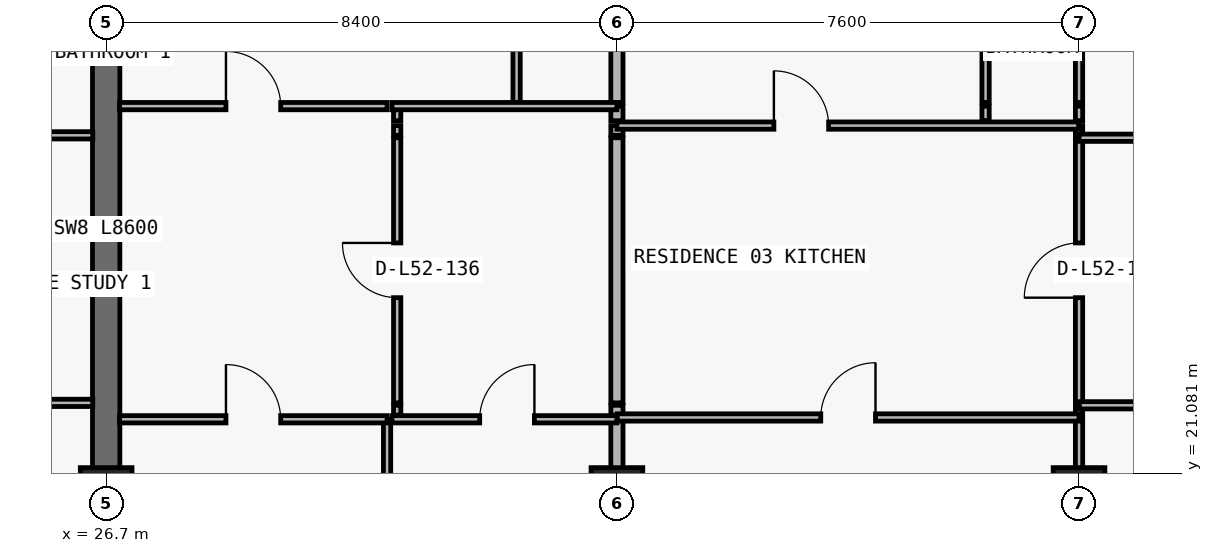
"""IFC4 building model, lengths in metres.
Left out: names, types, materials, properties, quantities, classifications, styles, units other than length and angle.
Written with IfcOpenShell. Run it as: python <this file> out.ifc"""

import sys

from ifc_helpers import new_model, si_unit, direction, frame, frame_2d, origin, origin_2d, place, context, subcontext, project, spatial, rectangle, extrude, element, fill, save


model = new_model("IFC4")
c1 = context("Model", 3, precision=1e-05, world=origin(), true_north=direction((0.0, 1.0)))
c2 = subcontext(c1, "Body", "Model", "MODEL_VIEW")
j1 = project(units=[si_unit("LENGTHUNIT", "METRE"), si_unit("PLANEANGLEUNIT", "RADIAN")], contexts=[c1])
p1 = place(None, origin())
s1 = spatial("IfcSite", under=j1, at=p1, CompositionType="ELEMENT")
p2 = place(p1, origin())
s2 = spatial("IfcBuilding", under=s1, at=p2, CompositionType="ELEMENT")
p3 = place(p2, frame((0.0, 0.0, 188.4)))
s3 = spatial("IfcBuildingStorey", under=s2, at=p3, CompositionType="ELEMENT", Elevation=188.4)
for number, where, z_axis, x_axis in (
    (1, (26.7, 20.8, 0.0), (0.0, 0.0, 1.0), (1.0, 0.0, 0.0)),
    (2, (35.1, 20.8, 0.0), (0.0, 0.0, 1.0), (1.0, 0.0, 0.0)),
    (3, (42.7, 20.8, 0.0), (0.0, 0.0, 1.0), (1.0, 0.0, 0.0)),
):
    element("IfcColumn", number, at=place(p3, frame(where, z_axis=z_axis, x_axis=x_axis)), inside=s3, PredefinedType="COLUMN", context=c2, shape_type="SweptSolid", body=[
        extrude(rectangle(XDim=0.85, YDim=0.75, at=origin_2d()), origin(), (0.0, 0.0, 1.0), 3.05),
    ])
p4 = place(p3, frame((26.7, 20.8, 0.0), z_axis=(0.0, 0.0, 1.0), x_axis=(0.0, 1.0, 0.0)))
e4 = element("IfcWall", 4, at=p4, inside=s3, PredefinedType="SHEAR", context=c2, shape_type="SweptSolid", body=[
    extrude(rectangle(XDim=8.6, YDim=0.45, at=frame_2d((4.3, 0.0))), origin(), (0.0, 0.0, 1.0), 3.05),
])
p5 = place(p3, frame((31.32, 11.24, 0.0), z_axis=(0.0, 0.0, 1.0), x_axis=(0.0, 1.0, 0.0)))
e5 = element("IfcWall", 5, at=p5, inside=s3, PredefinedType="PARTITIONING", context=c2, shape_type="SweptSolid", body=[
    extrude(rectangle(XDim=10.73, YDim=0.12, at=frame_2d((5.365, 0.0))), origin(), (0.0, 0.0, 1.0), 3.05),
])
p6 = place(p3, frame((31.486, 22.04, 0.0), z_axis=(0.0, 0.0, 1.0), x_axis=(0.0, 1.0, 0.0)))
e6 = element("IfcWall", 6, at=p6, inside=s3, PredefinedType="PARTITIONING", context=c2, shape_type="SweptSolid", body=[
    extrude(rectangle(XDim=0.16, YDim=0.12, at=frame_2d((0.08, 0.0))), origin(), (0.0, 0.0, 1.0), 3.05),
])
p7 = place(p3, frame((31.486, 22.24, 0.0), z_axis=(0.0, 0.0, 1.0), x_axis=(0.0, 1.0, 0.0)))
e7 = element("IfcWall", 7, at=p7, inside=s3, PredefinedType="PARTITIONING", context=c2, shape_type="SweptSolid", body=[
    extrude(rectangle(XDim=4.36, YDim=0.12, at=frame_2d((2.18, 0.0))), origin(), (0.0, 0.0, 1.0), 3.05),
])
p8 = place(p7, frame((1.73, 0.0, 0.0)))
e8 = element("IfcOpeningElement", 8, at=p8, cuts=e7, PredefinedType="OPENING", context=c2, shape_type="SweptSolid", body=[
    extrude(rectangle(XDim=0.9, YDim=2.15, at=frame_2d((0.45, 1.075))), frame((0.0, 0.07, 0.0), z_axis=(0.0, -1.0, 0.0), x_axis=(1.0, 0.0, 0.0)), (0.0, 0.0, 1.0), 0.14),
])
p9 = place(p3, frame((31.486, 26.64, 0.0), z_axis=(0.0, 0.0, 1.0), x_axis=(0.0, 1.0, 0.0)))
e9 = element("IfcWall", 9, at=p9, inside=s3, PredefinedType="PARTITIONING", context=c2, shape_type="SweptSolid", body=[
    extrude(rectangle(XDim=0.16, YDim=0.12, at=frame_2d((0.08, 0.0))), origin(), (0.0, 0.0, 1.0), 3.05),
])
p10 = place(p3, frame((31.486, 26.88, 0.0), z_axis=(0.0, 0.0, 1.0), x_axis=(0.0, 1.0, 0.0)))
e10 = element("IfcWall", 10, at=p10, inside=s3, PredefinedType="PARTITIONING", context=c2, shape_type="SweptSolid", body=[
    extrude(rectangle(XDim=0.24, YDim=0.12, at=frame_2d((0.12, 0.0))), origin(), (0.0, 0.0, 1.0), 3.05),
])
p11 = place(p3, frame((33.45, 27.18, 0.0), z_axis=(0.0, 0.0, 1.0), x_axis=(0.0, 1.0, 0.0)))
e11 = element("IfcWall", 11, at=p11, inside=s3, PredefinedType="PARTITIONING", context=c2, shape_type="SweptSolid", body=[
    extrude(rectangle(XDim=6.32, YDim=0.12, at=frame_2d((3.16, 0.0))), origin(), (0.0, 0.0, 1.0), 3.05),
])
p12 = place(p11, frame((3.035, 0.0, 0.0)))
e12 = element("IfcOpeningElement", 12, at=p12, cuts=e11, PredefinedType="OPENING", context=c2, shape_type="SweptSolid", body=[
    extrude(rectangle(XDim=0.85, YDim=2.1, at=frame_2d((0.425, 1.05))), frame((0.0, 0.07, 0.0), z_axis=(0.0, -1.0, 0.0), x_axis=(1.0, 0.0, 0.0)), (0.0, 0.0, 1.0), 0.14),
])
p13 = place(p3, frame((35.1, 11.24, 0.0), z_axis=(0.0, 0.0, 1.0), x_axis=(0.0, 1.0, 0.0)))
e13 = element("IfcWall", 13, at=p13, inside=s3, PredefinedType="PARTITIONING", context=c2, shape_type="SweptSolid", body=[
    extrude(rectangle(XDim=10.73, YDim=0.2, at=frame_2d((5.365, 0.0))), origin(), (0.0, 0.0, 1.0), 2.263),
])
p14 = place(p3, frame((35.1, 22.04, 0.0), z_axis=(0.0, 0.0, 1.0), x_axis=(0.0, 1.0, 0.0)))
e14 = element("IfcWall", 14, at=p14, inside=s3, PredefinedType="PARTITIONING", context=c2, shape_type="SweptSolid", body=[
    extrude(rectangle(XDim=0.16, YDim=0.2, at=frame_2d((0.08, 0.0))), origin(), (0.0, 0.0, 1.0), 2.263),
])
p15 = place(p3, frame((35.1, 22.24, 0.0), z_axis=(0.0, 0.0, 1.0), x_axis=(0.0, 1.0, 0.0)))
e15 = element("IfcWall", 15, at=p15, inside=s3, PredefinedType="PARTITIONING", context=c2, shape_type="SweptSolid", body=[
    extrude(rectangle(XDim=4.36, YDim=0.2, at=frame_2d((2.18, 0.0))), origin(), (0.0, 0.0, 1.0), 2.263),
])
p16 = place(p3, frame((35.1, 26.64, 0.0), z_axis=(0.0, 0.0, 1.0), x_axis=(0.0, 1.0, 0.0)))
e16 = element("IfcWall", 16, at=p16, inside=s3, PredefinedType="PARTITIONING", context=c2, shape_type="SweptSolid", body=[
    extrude(rectangle(XDim=0.16, YDim=0.2, at=frame_2d((0.08, 0.0))), origin(), (0.0, 0.0, 1.0), 2.263),
])
p17 = place(p3, frame((35.1, 26.88, 0.0), z_axis=(0.0, 0.0, 1.0), x_axis=(0.0, 1.0, 0.0)))
e17 = element("IfcWall", 17, at=p17, inside=s3, PredefinedType="PARTITIONING", context=c2, shape_type="SweptSolid", body=[
    extrude(rectangle(XDim=0.24, YDim=0.2, at=frame_2d((0.12, 0.0))), origin(), (0.0, 0.0, 1.0), 2.263),
])
p18 = place(p3, frame((35.1, 27.18, 0.0), z_axis=(0.0, 0.0, 1.0), x_axis=(0.0, 1.0, 0.0)))
e18 = element("IfcWall", 18, at=p18, inside=s3, PredefinedType="PARTITIONING", context=c2, shape_type="SweptSolid", body=[
    extrude(rectangle(XDim=6.32, YDim=0.2, at=frame_2d((3.16, 0.0))), origin(), (0.0, 0.0, 1.0), 2.263),
])
p19 = place(p3, frame((41.163, 26.88, 0.0), z_axis=(0.0, 0.0, 1.0), x_axis=(0.0, 1.0, 0.0)))
e19 = element("IfcWall", 19, at=p19, inside=s3, PredefinedType="PARTITIONING", context=c2, shape_type="SweptSolid", body=[
    extrude(rectangle(XDim=0.24, YDim=0.12, at=frame_2d((0.12, 0.0))), origin(), (0.0, 0.0, 1.0), 3.05),
])
p20 = place(p3, frame((41.163, 27.18, 0.0), z_axis=(0.0, 0.0, 1.0), x_axis=(0.0, 1.0, 0.0)))
e20 = element("IfcWall", 20, at=p20, inside=s3, PredefinedType="PARTITIONING", context=c2, shape_type="SweptSolid", body=[
    extrude(rectangle(XDim=6.32, YDim=0.12, at=frame_2d((3.16, 0.0))), origin(), (0.0, 0.0, 1.0), 3.05),
])
p21 = place(p20, frame((3.035, 0.0, 0.0)))
e21 = element("IfcOpeningElement", 21, at=p21, cuts=e20, PredefinedType="OPENING", context=c2, shape_type="SweptSolid", body=[
    extrude(rectangle(XDim=0.85, YDim=2.1, at=frame_2d((0.425, 1.05))), frame((0.0, 0.07, 0.0), z_axis=(0.0, -1.0, 0.0), x_axis=(1.0, 0.0, 0.0)), (0.0, 0.0, 1.0), 0.14),
])
p22 = place(p3, frame((42.7, 11.24, 0.0), z_axis=(0.0, 0.0, 1.0), x_axis=(0.0, 1.0, 0.0)))
e22 = element("IfcWall", 22, at=p22, inside=s3, PredefinedType="PARTITIONING", context=c2, shape_type="SweptSolid", body=[
    extrude(rectangle(XDim=10.73, YDim=0.12, at=frame_2d((5.365, 0.0))), origin(), (0.0, 0.0, 1.0), 2.263),
])
p23 = place(p3, frame((42.7, 22.04, 0.0), z_axis=(0.0, 0.0, 1.0), x_axis=(0.0, 1.0, 0.0)))
e23 = element("IfcWall", 23, at=p23, inside=s3, PredefinedType="PARTITIONING", context=c2, shape_type="SweptSolid", body=[
    extrude(rectangle(XDim=0.16, YDim=0.12, at=frame_2d((0.08, 0.0))), origin(), (0.0, 0.0, 1.0), 2.263),
])
p24 = place(p3, frame((42.7, 22.24, 0.0), z_axis=(0.0, 0.0, 1.0), x_axis=(0.0, 1.0, 0.0)))
e24 = element("IfcWall", 24, at=p24, inside=s3, PredefinedType="PARTITIONING", context=c2, shape_type="SweptSolid", body=[
    extrude(rectangle(XDim=4.36, YDim=0.12, at=frame_2d((2.18, 0.0))), origin(), (0.0, 0.0, 1.0), 2.263),
])
p25 = place(p24, frame((1.73, 0.0, 0.0)))
e25 = element("IfcOpeningElement", 25, at=p25, cuts=e24, PredefinedType="OPENING", context=c2, shape_type="SweptSolid", body=[
    extrude(rectangle(XDim=0.9, YDim=2.15, at=frame_2d((0.45, 1.075))), frame((0.0, 0.07, 0.0), z_axis=(0.0, -1.0, 0.0), x_axis=(1.0, 0.0, 0.0)), (0.0, 0.0, 1.0), 0.14),
])
p26 = place(p3, frame((42.7, 26.64, 0.0), z_axis=(0.0, 0.0, 1.0), x_axis=(0.0, 1.0, 0.0)))
e26 = element("IfcWall", 26, at=p26, inside=s3, PredefinedType="PARTITIONING", context=c2, shape_type="SweptSolid", body=[
    extrude(rectangle(XDim=0.16, YDim=0.12, at=frame_2d((0.08, 0.0))), origin(), (0.0, 0.0, 1.0), 2.263),
])
p27 = place(p3, frame((42.7, 26.88, 0.0), z_axis=(0.0, 0.0, 1.0), x_axis=(0.0, 1.0, 0.0)))
e27 = element("IfcWall", 27, at=p27, inside=s3, PredefinedType="PARTITIONING", context=c2, shape_type="SweptSolid", body=[
    extrude(rectangle(XDim=0.24, YDim=0.12, at=frame_2d((0.12, 0.0))), origin(), (0.0, 0.0, 1.0), 2.263),
])
p28 = place(p3, frame((42.7, 27.18, 0.0), z_axis=(0.0, 0.0, 1.0), x_axis=(0.0, 1.0, 0.0)))
e28 = element("IfcWall", 28, at=p28, inside=s3, PredefinedType="PARTITIONING", context=c2, shape_type="SweptSolid", body=[
    extrude(rectangle(XDim=6.32, YDim=0.12, at=frame_2d((3.16, 0.0))), origin(), (0.0, 0.0, 1.0), 2.263),
])
p29 = place(p3, frame((26.92, 21.97, 0.0), z_axis=(0.0, 0.0, 1.0), x_axis=(1.0, 0.0, 0.0)))
e29 = element("IfcWall", 29, at=p29, inside=s3, PredefinedType="PARTITIONING", context=c2, shape_type="SweptSolid", body=[
    extrude(rectangle(XDim=4.4, YDim=0.12, at=frame_2d((2.2, 0.0))), origin(), (0.0, 0.0, 1.0), 3.05),
])
p30 = place(p29, frame((1.75, 0.0, 0.0)))
e30 = element("IfcOpeningElement", 30, at=p30, cuts=e29, PredefinedType="OPENING", context=c2, shape_type="SweptSolid", body=[
    extrude(rectangle(XDim=0.9, YDim=2.15, at=frame_2d((0.45, 1.075))), frame((0.0, 0.07, 0.0), z_axis=(0.0, -1.0, 0.0), x_axis=(1.0, 0.0, 0.0)), (0.0, 0.0, 1.0), 0.14),
])
p31 = place(p3, frame((31.4, 21.97, 0.0), z_axis=(0.0, 0.0, 1.0), x_axis=(1.0, 0.0, 0.0)))
e31 = element("IfcWall", 31, at=p31, inside=s3, PredefinedType="PARTITIONING", context=c2, shape_type="SweptSolid", body=[
    extrude(rectangle(XDim=3.7, YDim=0.12, at=frame_2d((1.85, 0.0))), origin(), (0.0, 0.0, 1.0), 3.05),
])
p32 = place(p31, frame((1.443, 0.0, 0.0)))
e32 = element("IfcOpeningElement", 32, at=p32, cuts=e31, PredefinedType="OPENING", context=c2, shape_type="SweptSolid", body=[
    extrude(rectangle(XDim=0.9, YDim=2.15, at=frame_2d((0.45, 1.075))), frame((0.0, 0.07, 0.0), z_axis=(0.0, -1.0, 0.0), x_axis=(1.0, 0.0, 0.0)), (0.0, 0.0, 1.0), 0.14),
])
p33 = place(p3, frame((35.105, 22.0, 0.0), z_axis=(0.0, 0.0, 1.0), x_axis=(1.0, 0.0, 0.0)))
e33 = element("IfcWall", 33, at=p33, inside=s3, PredefinedType="PARTITIONING", context=c2, shape_type="SweptSolid", body=[
    extrude(rectangle(XDim=7.595, YDim=0.12, at=frame_2d((3.797, 0.0))), origin(), (0.0, 0.0, 1.0), 3.05),
])
p34 = place(p33, frame((3.347, 0.0, 0.0)))
e34 = element("IfcOpeningElement", 34, at=p34, cuts=e33, PredefinedType="OPENING", context=c2, shape_type="SweptSolid", body=[
    extrude(rectangle(XDim=0.9, YDim=2.15, at=frame_2d((0.45, 1.075))), frame((0.0, 0.07, 0.0), z_axis=(0.0, -1.0, 0.0), x_axis=(1.0, 0.0, 0.0)), (0.0, 0.0, 1.0), 0.14),
])
p35 = place(p3, frame((42.705, 22.2, 0.0), z_axis=(0.0, 0.0, 1.0), x_axis=(1.0, 0.0, 0.0)))
e35 = element("IfcWall", 35, at=p35, inside=s3, PredefinedType="PARTITIONING", context=c2, shape_type="SweptSolid", body=[
    extrude(rectangle(XDim=8.175, YDim=0.12, at=frame_2d((4.087, 0.0))), origin(), (0.0, 0.0, 1.0), 3.05),
])
p36 = place(p35, frame((3.637, 0.0, 0.0)))
e36 = element("IfcOpeningElement", 36, at=p36, cuts=e35, PredefinedType="OPENING", context=c2, shape_type="SweptSolid", body=[
    extrude(rectangle(XDim=0.9, YDim=2.15, at=frame_2d((0.45, 1.075))), frame((0.0, 0.07, 0.0), z_axis=(0.0, -1.0, 0.0), x_axis=(1.0, 0.0, 0.0)), (0.0, 0.0, 1.0), 0.14),
])
p37 = place(p3, frame((18.305, 22.24, 0.0), z_axis=(0.0, 0.0, 1.0), x_axis=(1.0, 0.0, 0.0)))
e37 = element("IfcWall", 37, at=p37, inside=s3, PredefinedType="PARTITIONING", context=c2, shape_type="SweptSolid", body=[
    extrude(rectangle(XDim=8.175, YDim=0.12, at=frame_2d((4.087, 0.0))), origin(), (0.0, 0.0, 1.0), 3.05),
])
p38 = place(p37, frame((3.637, 0.0, 0.0)))
e38 = element("IfcOpeningElement", 38, at=p38, cuts=e37, PredefinedType="OPENING", context=c2, shape_type="SweptSolid", body=[
    extrude(rectangle(XDim=0.9, YDim=2.15, at=frame_2d((0.45, 1.075))), frame((0.0, 0.07, 0.0), z_axis=(0.0, -1.0, 0.0), x_axis=(1.0, 0.0, 0.0)), (0.0, 0.0, 1.0), 0.14),
])
p39 = place(p3, frame((42.7, 26.6, 0.0), z_axis=(0.0, 0.0, 1.0), x_axis=(1.0, 0.0, 0.0)))
e39 = element("IfcWall", 39, at=p39, inside=s3, PredefinedType="PARTITIONING", context=c2, shape_type="SweptSolid", body=[
    extrude(rectangle(XDim=8.18, YDim=0.12, at=frame_2d((4.09, 0.0))), origin(), (0.0, 0.0, 1.0), 3.05),
])
p40 = place(p39, frame((3.0, 0.0, 0.0)))
e40 = element("IfcOpeningElement", 40, at=p40, cuts=e39, PredefinedType="OPENING", context=c2, shape_type="SweptSolid", body=[
    extrude(rectangle(XDim=0.9, YDim=2.15, at=frame_2d((0.45, 1.075))), frame((0.0, 0.07, 0.0), z_axis=(0.0, -1.0, 0.0), x_axis=(1.0, 0.0, 0.0)), (0.0, 0.0, 1.0), 0.14),
])
p41 = place(p3, frame((18.3, 26.64, 0.0), z_axis=(0.0, 0.0, 1.0), x_axis=(1.0, 0.0, 0.0)))
e41 = element("IfcWall", 41, at=p41, inside=s3, PredefinedType="PARTITIONING", context=c2, shape_type="SweptSolid", body=[
    extrude(rectangle(XDim=8.18, YDim=0.12, at=frame_2d((4.09, 0.0))), origin(), (0.0, 0.0, 1.0), 3.05),
])
p42 = place(p41, frame((3.0, 0.0, 0.0)))
e42 = element("IfcOpeningElement", 42, at=p42, cuts=e41, PredefinedType="OPENING", context=c2, shape_type="SweptSolid", body=[
    extrude(rectangle(XDim=0.9, YDim=2.15, at=frame_2d((0.45, 1.075))), frame((0.0, 0.07, 0.0), z_axis=(0.0, -1.0, 0.0), x_axis=(1.0, 0.0, 0.0)), (0.0, 0.0, 1.0), 0.14),
])
p43 = place(p3, frame((35.1, 26.8, 0.0), z_axis=(0.0, 0.0, 1.0), x_axis=(1.0, 0.0, 0.0)))
e43 = element("IfcWall", 43, at=p43, inside=s3, PredefinedType="PARTITIONING", context=c2, shape_type="SweptSolid", body=[
    extrude(rectangle(XDim=7.595, YDim=0.12, at=frame_2d((3.797, 0.0))), origin(), (0.0, 0.0, 1.0), 3.05),
])
p44 = place(p43, frame((2.582, 0.0, 0.0)))
e44 = element("IfcOpeningElement", 44, at=p44, cuts=e43, PredefinedType="OPENING", context=c2, shape_type="SweptSolid", body=[
    extrude(rectangle(XDim=0.9, YDim=2.15, at=frame_2d((0.45, 1.075))), frame((0.0, 0.07, 0.0), z_axis=(0.0, -1.0, 0.0), x_axis=(1.0, 0.0, 0.0)), (0.0, 0.0, 1.0), 0.14),
])
p45 = place(p3, frame((26.92, 27.12, 0.0), z_axis=(0.0, 0.0, 1.0), x_axis=(1.0, 0.0, 0.0)))
e45 = element("IfcWall", 45, at=p45, inside=s3, PredefinedType="PARTITIONING", context=c2, shape_type="SweptSolid", body=[
    extrude(rectangle(XDim=4.4, YDim=0.12, at=frame_2d((2.2, 0.0))), origin(), (0.0, 0.0, 1.0), 3.05),
])
p46 = place(p45, frame((1.75, 0.0, 0.0)))
e46 = element("IfcOpeningElement", 46, at=p46, cuts=e45, PredefinedType="OPENING", context=c2, shape_type="SweptSolid", body=[
    extrude(rectangle(XDim=0.9, YDim=2.15, at=frame_2d((0.45, 1.075))), frame((0.0, 0.07, 0.0), z_axis=(0.0, -1.0, 0.0), x_axis=(1.0, 0.0, 0.0)), (0.0, 0.0, 1.0), 0.14),
])
p47 = place(p3, frame((31.4, 27.12, 0.0), z_axis=(0.0, 0.0, 1.0), x_axis=(1.0, 0.0, 0.0)))
e47 = element("IfcWall", 47, at=p47, inside=s3, PredefinedType="PARTITIONING", context=c2, shape_type="SweptSolid", body=[
    extrude(rectangle(XDim=3.7, YDim=0.12, at=frame_2d((1.85, 0.0))), origin(), (0.0, 0.0, 1.0), 3.05),
])
p48 = place(p46, origin())
e48 = element("IfcDoor", 48, at=p48, inside=s3, OperationType="SINGLE_SWING_LEFT", PredefinedType="DOOR", context=c2, shape_type="SweptSolid", body=[
    extrude(rectangle(XDim=0.9, YDim=2.15, at=frame_2d((0.45, 1.075))), frame((0.0, 0.025, 0.0), z_axis=(0.0, -1.0, 0.0), x_axis=(1.0, 0.0, 0.0)), (0.0, 0.0, 1.0), 0.05),
])
fill(e46, e48)
p49 = place(p8, origin())
e49 = element("IfcDoor", 49, at=p49, inside=s3, OperationType="SINGLE_SWING_RIGHT", PredefinedType="DOOR", context=c2, shape_type="SweptSolid", body=[
    extrude(rectangle(XDim=0.9, YDim=2.15, at=frame_2d((0.45, 1.075))), frame((0.0, 0.025, 0.0), z_axis=(0.0, -1.0, 0.0), x_axis=(1.0, 0.0, 0.0)), (0.0, 0.0, 1.0), 0.05),
])
fill(e8, e49)
p50 = place(p30, origin())
e50 = element("IfcDoor", 50, at=p50, inside=s3, OperationType="SINGLE_SWING_LEFT", PredefinedType="DOOR", context=c2, shape_type="SweptSolid", body=[
    extrude(rectangle(XDim=0.9, YDim=2.15, at=frame_2d((0.45, 1.075))), frame((0.0, 0.025, 0.0), z_axis=(0.0, -1.0, 0.0), x_axis=(1.0, 0.0, 0.0)), (0.0, 0.0, 1.0), 0.05),
])
fill(e30, e50)
p51 = place(p32, origin())
e51 = element("IfcDoor", 51, at=p51, inside=s3, OperationType="SINGLE_SWING_RIGHT", PredefinedType="DOOR", context=c2, shape_type="SweptSolid", body=[
    extrude(rectangle(XDim=0.9, YDim=2.15, at=frame_2d((0.45, 1.075))), frame((0.0, 0.025, 0.0), z_axis=(0.0, -1.0, 0.0), x_axis=(1.0, 0.0, 0.0)), (0.0, 0.0, 1.0), 0.05),
])
fill(e32, e51)
p52 = place(p44, origin())
e52 = element("IfcDoor", 52, at=p52, inside=s3, OperationType="SINGLE_SWING_LEFT", PredefinedType="DOOR", context=c2, shape_type="SweptSolid", body=[
    extrude(rectangle(XDim=0.9, YDim=2.15, at=frame_2d((0.45, 1.075))), frame((0.0, 0.025, 0.0), z_axis=(0.0, -1.0, 0.0), x_axis=(1.0, 0.0, 0.0)), (0.0, 0.0, 1.0), 0.05),
])
fill(e44, e52)
p53 = place(p34, origin())
e53 = element("IfcDoor", 53, at=p53, inside=s3, OperationType="SINGLE_SWING_RIGHT", PredefinedType="DOOR", context=c2, shape_type="SweptSolid", body=[
    extrude(rectangle(XDim=0.9, YDim=2.15, at=frame_2d((0.45, 1.075))), frame((0.0, 0.025, 0.0), z_axis=(0.0, -1.0, 0.0), x_axis=(1.0, 0.0, 0.0)), (0.0, 0.0, 1.0), 0.05),
])
fill(e34, e53)
p54 = place(p25, origin())
e54 = element("IfcDoor", 54, at=p54, inside=s3, OperationType="SINGLE_SWING_LEFT", PredefinedType="DOOR", context=c2, shape_type="SweptSolid", body=[
    extrude(rectangle(XDim=0.9, YDim=2.15, at=frame_2d((0.45, 1.075))), frame((0.0, 0.025, 0.0), z_axis=(0.0, -1.0, 0.0), x_axis=(1.0, 0.0, 0.0)), (0.0, 0.0, 1.0), 0.05),
])
fill(e25, e54)
save(model, sys.argv[1])
